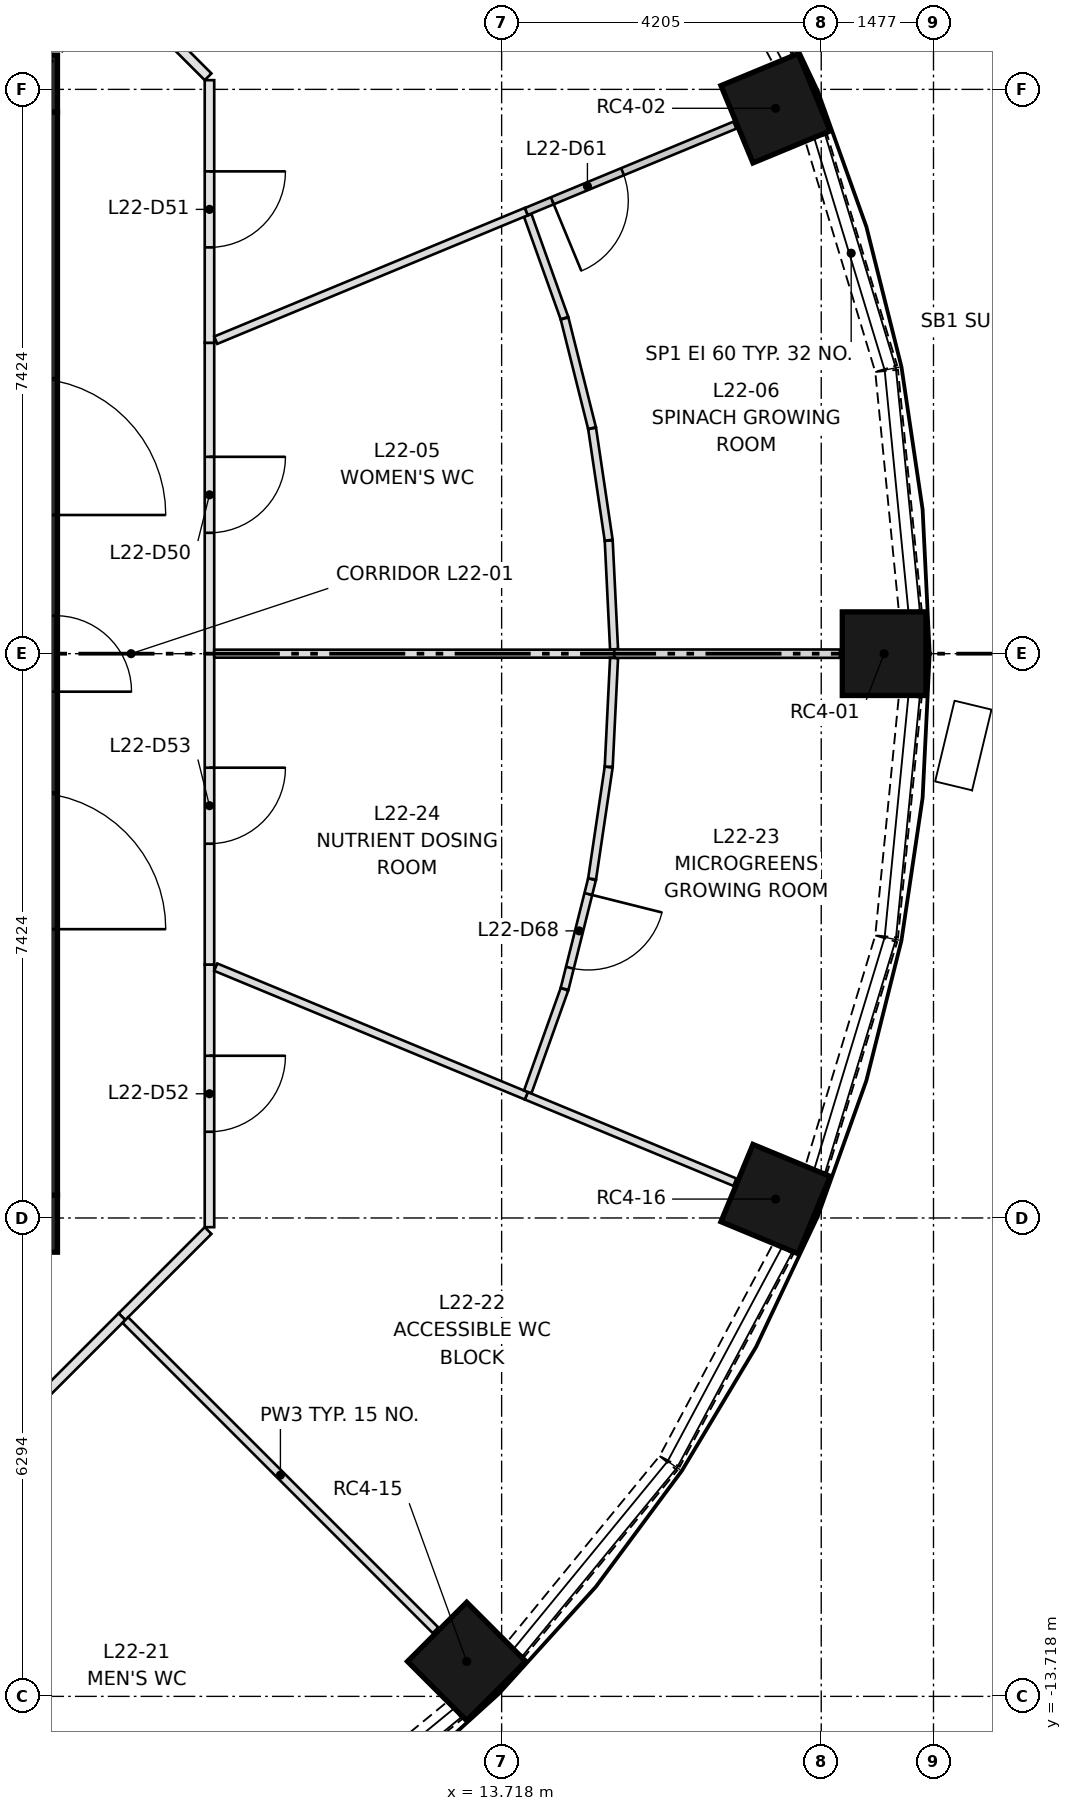
"""IFC4 building model, lengths in metres.
Left out: names, types, materials, properties, quantities, classifications, styles, units other than length and angle.
Written with IfcOpenShell. Run it as: python <this file> out.ifc"""

import sys

from ifc_helpers import new_model, si_unit, direction, frame, frame_2d, origin, origin_2d, place, context, subcontext, project, spatial, rectangle, extrude, element, fill, save


model = new_model("IFC4")
c1 = context("Model", 3, precision=1e-05, world=origin(), true_north=direction((0.0, 1.0)))
c2 = subcontext(c1, "Body", "Model", "MODEL_VIEW")
j1 = project(units=[si_unit("LENGTHUNIT", "METRE"), si_unit("PLANEANGLEUNIT", "RADIAN")], contexts=[c1])
p1 = place(None, origin())
s1 = spatial("IfcSite", under=j1, at=p1, CompositionType="ELEMENT")
p2 = place(p1, origin())
s2 = spatial("IfcBuilding", under=s1, at=p2, CompositionType="ELEMENT")
p3 = place(p2, frame((0.0, 0.0, 87.35)))
s3 = spatial("IfcBuildingStorey", under=s2, at=p3, CompositionType="ELEMENT", Elevation=87.35)
for number, where, z_axis, x_axis in (
    (1, (18.75, 0.0, 0.0), (0.0, 0.0, 1.0), (1.0, 0.0, 0.0)),
    (2, (17.323, 7.175, 0.0), (0.0, 0.0, 1.0), (0.924, 0.383, 0.0)),
    (3, (13.258, -13.258, 0.0), (0.0, 0.0, 1.0), (0.707, -0.707, 0.0)),
    (4, (17.323, -7.175, 0.0), (0.0, 0.0, 1.0), (0.924, -0.383, 0.0)),
):
    element("IfcColumn", number, at=place(p3, frame(where, z_axis=z_axis, x_axis=x_axis)), inside=s3, PredefinedType="COLUMN", context=c2, shape_type="SweptSolid", body=[
        extrude(rectangle(XDim=1.1, YDim=1.1, at=origin_2d()), origin(), (0.0, 0.0, 1.0), 3.65),
    ])
for number, where, z_axis, x_axis in (
    (5, (-7.874, -7.499, 0.0), (0.0, 0.0, 1.0), (1.0, 0.0, 0.0)),
    (6, (-7.874, 7.499, 0.0), (0.0, 0.0, 1.0), (1.0, 0.0, 0.0)),
):
    element("IfcWall", number, at=place(p3, frame(where, z_axis=z_axis, x_axis=x_axis)), inside=s3, PredefinedType="SHEAR", context=c2, shape_type="SweptSolid", body=[
        extrude(rectangle(XDim=15.748, YDim=0.75, at=frame_2d((7.874, 0.0))), origin(), (0.0, 0.0, 1.0), 3.65),
    ])
p4 = place(p3, frame((7.499, -7.124, 0.0), z_axis=(0.0, 0.0, 1.0), x_axis=(0.0, 1.0, 0.0)))
e7 = element("IfcWall", 7, at=p4, inside=s3, PredefinedType="SHEAR", context=c2, shape_type="SweptSolid", body=[
    extrude(rectangle(XDim=14.248, YDim=0.75, at=frame_2d((7.124, 0.0))), origin(), (0.0, 0.0, 1.0), 3.65),
])
p5 = place(p4, frame((6.624, 0.0, 0.0)))
e8 = element("IfcOpeningElement", 8, at=p5, cuts=e7, PredefinedType="OPENING", context=c2, shape_type="SweptSolid", body=[
    extrude(rectangle(XDim=1.0, YDim=2.1, at=frame_2d((0.5, 1.05))), frame((0.0, 0.385, 0.0), z_axis=(0.0, -1.0, 0.0), x_axis=(1.0, 0.0, 0.0)), (0.0, 0.0, 1.0), 0.77),
])
p6 = place(p4, frame((3.5, 0.0, 0.0)))
e9 = element("IfcOpeningElement", 9, at=p6, cuts=e7, PredefinedType="OPENING", context=c2, shape_type="SweptSolid", body=[
    extrude(rectangle(XDim=1.8, YDim=2.1, at=frame_2d((0.9, 1.05))), frame((0.0, 0.385, 0.0), z_axis=(0.0, -1.0, 0.0), x_axis=(1.0, 0.0, 0.0)), (0.0, 0.0, 1.0), 0.77),
])
p7 = place(p4, frame((8.948, 0.0, 0.0)))
e10 = element("IfcOpeningElement", 10, at=p7, cuts=e7, PredefinedType="OPENING", context=c2, shape_type="SweptSolid", body=[
    extrude(rectangle(XDim=1.8, YDim=2.1, at=frame_2d((0.9, 1.05))), frame((0.0, 0.385, 0.0), z_axis=(0.0, -1.0, 0.0), x_axis=(1.0, 0.0, 0.0)), (0.0, 0.0, 1.0), 0.77),
])
p8 = place(p3, frame((19.094, 0.564, 0.0), z_axis=(0.0, 0.0, 1.0), x_axis=(-0.098040704044, 0.995182405567, 0.0)))
e11 = element("IfcWall", 11, at=p8, inside=s3, PredefinedType="SOLIDWALL", context=c2, shape_type="SweptSolid", body=[
    extrude(rectangle(XDim=3.173, YDim=0.3, at=frame_2d((1.586, 0.0))), origin(), (0.0, 0.0, 1.0), 0.9),
])
p9 = place(p3, frame((18.778, 3.75, 0.0), z_axis=(0.0, 0.0, 1.0), x_axis=(-0.290325591482, 0.956927923582, 0.0)))
e12 = element("IfcWall", 12, at=p9, inside=s3, PredefinedType="SOLIDWALL", context=c2, shape_type="SweptSolid", body=[
    extrude(rectangle(XDim=3.173, YDim=0.3, at=frame_2d((1.586, 0.0))), origin(), (0.0, 0.0, 1.0), 0.9),
])
p10 = place(p3, frame((17.425, 7.828, 0.0), z_axis=(0.0, 0.0, 1.0), x_axis=(-0.471458802606, 0.88188808669, 0.0)))
e13 = element("IfcWall", 13, at=p10, inside=s3, PredefinedType="SOLIDWALL", context=c2, shape_type="SweptSolid", body=[
    extrude(rectangle(XDim=3.172, YDim=0.3, at=frame_2d((1.586, 0.0))), origin(), (0.0, 0.0, 1.0), 0.9),
])
for number, where, z_axis, x_axis in (
    (14, (10.651, -15.913, 0.0), (0.0, 0.0, 1.0), (0.773, 0.634, 0.0)),
    (15, (13.9, -13.104, 0.0), (0.0, 0.0, 1.0), (0.634, 0.773, 0.0)),
):
    element("IfcWall", number, at=place(p3, frame(where, z_axis=z_axis, x_axis=x_axis)), inside=s3, PredefinedType="SOLIDWALL", context=c2, shape_type="SweptSolid", body=[
        extrude(rectangle(XDim=3.173, YDim=0.3, at=frame_2d((1.586, 0.0))), origin(), (0.0, 0.0, 1.0), 0.9),
    ])
p11 = place(p3, frame((15.929, -10.626, 0.0), z_axis=(0.0, 0.0, 1.0), x_axis=(0.471458802606, 0.88188808669, 0.0)))
e16 = element("IfcWall", 16, at=p11, inside=s3, PredefinedType="SOLIDWALL", context=c2, shape_type="SweptSolid", body=[
    extrude(rectangle(XDim=3.172, YDim=0.3, at=frame_2d((1.586, 0.0))), origin(), (0.0, 0.0, 1.0), 0.9),
])
p12 = place(p3, frame((17.856, -6.787, 0.0), z_axis=(0.0, 0.0, 1.0), x_axis=(0.290325591482, 0.956927923582, 0.0)))
e17 = element("IfcWall", 17, at=p12, inside=s3, PredefinedType="SOLIDWALL", context=c2, shape_type="SweptSolid", body=[
    extrude(rectangle(XDim=3.173, YDim=0.3, at=frame_2d((1.586, 0.0))), origin(), (0.0, 0.0, 1.0), 0.9),
])
p13 = place(p3, frame((18.783, -3.721, 0.0), z_axis=(0.0, 0.0, 1.0), x_axis=(0.098040704044, 0.995182405567, 0.0)))
e18 = element("IfcWall", 18, at=p13, inside=s3, PredefinedType="SOLIDWALL", context=c2, shape_type="SweptSolid", body=[
    extrude(rectangle(XDim=3.173, YDim=0.3, at=frame_2d((1.586, 0.0))), origin(), (0.0, 0.0, 1.0), 0.9),
])
p14 = place(p3, frame((9.874, 4.09, 0.0), z_axis=(0.0, 0.0, 1.0), x_axis=(0.0, -1.0, 0.0)))
e19 = element("IfcWall", 19, at=p14, inside=s3, PredefinedType="PARTITIONING", context=c2, shape_type="SweptSolid", body=[
    extrude(rectangle(XDim=4.09, YDim=0.125, at=frame_2d((2.045, 0.0))), origin(), (0.0, 0.0, 1.0), 3.3),
])
p15 = place(p14, frame((1.5, 0.0, 0.0)))
e20 = element("IfcOpeningElement", 20, at=p15, cuts=e19, PredefinedType="OPENING", context=c2, shape_type="SweptSolid", body=[
    extrude(rectangle(XDim=1.0, YDim=2.1, at=frame_2d((0.5, 1.05))), frame((0.0, 0.073, 0.0), z_axis=(0.0, -1.0, 0.0), x_axis=(1.0, 0.0, 0.0)), (0.0, 0.0, 1.0), 0.145),
])
p16 = place(p3, frame((8.722, 8.722, 0.0), z_axis=(0.0, 0.0, 1.0), x_axis=(0.70718294931, -0.707030604857, 0.0)))
e21 = element("IfcWall", 21, at=p16, inside=s3, PredefinedType="PARTITIONING", context=c2, shape_type="SweptSolid", body=[
    extrude(rectangle(XDim=1.603, YDim=0.125, at=frame_2d((0.801, 0.0))), origin(), (0.0, 0.0, 1.0), 3.3),
])
p17 = place(p3, frame((9.874, 7.545, 0.0), z_axis=(0.0, 0.0, 1.0), x_axis=(0.0, -1.0, 0.0)))
e22 = element("IfcWall", 22, at=p17, inside=s3, PredefinedType="PARTITIONING", context=c2, shape_type="SweptSolid", body=[
    extrude(rectangle(XDim=3.455, YDim=0.125, at=frame_2d((1.728, 0.0))), origin(), (0.0, 0.0, 1.0), 3.3),
])
p18 = place(p17, frame((1.2, 0.0, 0.0)))
e23 = element("IfcOpeningElement", 23, at=p18, cuts=e22, PredefinedType="OPENING", context=c2, shape_type="SweptSolid", body=[
    extrude(rectangle(XDim=1.0, YDim=2.1, at=frame_2d((0.5, 1.05))), frame((0.0, 0.073, 0.0), z_axis=(0.0, -1.0, 0.0), x_axis=(1.0, 0.0, 0.0)), (0.0, 0.0, 1.0), 0.145),
])
p19 = place(p3, frame((9.856, -7.589, 0.0), z_axis=(0.0, 0.0, 1.0), x_axis=(-0.70718294931, -0.707030604857, 0.0)))
e24 = element("IfcWall", 24, at=p19, inside=s3, PredefinedType="PARTITIONING", context=c2, shape_type="SweptSolid", body=[
    extrude(rectangle(XDim=1.603, YDim=0.125, at=frame_2d((0.801, 0.0))), origin(), (0.0, 0.0, 1.0), 3.3),
])
p20 = place(p3, frame((9.874, -4.09, 0.0), z_axis=(0.0, 0.0, 1.0), x_axis=(0.0, -1.0, 0.0)))
e25 = element("IfcWall", 25, at=p20, inside=s3, PredefinedType="PARTITIONING", context=c2, shape_type="SweptSolid", body=[
    extrude(rectangle(XDim=3.455, YDim=0.125, at=frame_2d((1.728, 0.0))), origin(), (0.0, 0.0, 1.0), 3.3),
])
p21 = place(p20, frame((1.2, 0.0, 0.0)))
e26 = element("IfcOpeningElement", 26, at=p21, cuts=e25, PredefinedType="OPENING", context=c2, shape_type="SweptSolid", body=[
    extrude(rectangle(XDim=1.0, YDim=2.1, at=frame_2d((0.5, 1.05))), frame((0.0, 0.073, 0.0), z_axis=(0.0, -1.0, 0.0), x_axis=(1.0, 0.0, 0.0)), (0.0, 0.0, 1.0), 0.145),
])
p22 = place(p3, frame((9.874, 0.0, 0.0), z_axis=(0.0, 0.0, 1.0), x_axis=(0.0, -1.0, 0.0)))
e27 = element("IfcWall", 27, at=p22, inside=s3, PredefinedType="PARTITIONING", context=c2, shape_type="SweptSolid", body=[
    extrude(rectangle(XDim=4.09, YDim=0.125, at=frame_2d((2.045, 0.0))), origin(), (0.0, 0.0, 1.0), 3.3),
])
p23 = place(p22, frame((1.5, 0.0, 0.0)))
e28 = element("IfcOpeningElement", 28, at=p23, cuts=e27, PredefinedType="OPENING", context=c2, shape_type="SweptSolid", body=[
    extrude(rectangle(XDim=1.0, YDim=2.1, at=frame_2d((0.5, 1.05))), frame((0.0, 0.073, 0.0), z_axis=(0.0, -1.0, 0.0), x_axis=(1.0, 0.0, 0.0)), (0.0, 0.0, 1.0), 0.145),
])
p24 = place(p3, frame((8.722, -8.722, 0.0), z_axis=(0.0, 0.0, 1.0), x_axis=(-0.707030604857, -0.70718294931, 0.0)))
e29 = element("IfcWall", 29, at=p24, inside=s3, PredefinedType="PARTITIONING", context=c2, shape_type="SweptSolid", body=[
    extrude(rectangle(XDim=1.603, YDim=0.125, at=frame_2d((0.801, 0.0))), origin(), (0.0, 0.0, 1.0), 3.3),
])
p25 = place(p3, frame((14.062, 5.765, 0.0), z_axis=(0.0, 0.0, 1.0), x_axis=(0.336940319535, -0.941526006583, 0.0)))
e30 = element("IfcWall", 30, at=p25, inside=s3, PredefinedType="PARTITIONING", context=c2, shape_type="SweptSolid", body=[
    extrude(rectangle(XDim=1.434, YDim=0.105, at=frame_2d((0.717, 0.0))), origin(), (0.0, 0.0, 1.0), 3.3),
])
p26 = place(p3, frame((14.546, 4.41, 0.0), z_axis=(0.0, 0.0, 1.0), x_axis=(0.242922070527, -0.970045806986, 0.0)))
e31 = element("IfcWall", 31, at=p26, inside=s3, PredefinedType="PARTITIONING", context=c2, shape_type="SweptSolid", body=[
    extrude(rectangle(XDim=1.486, YDim=0.105, at=frame_2d((0.743, 0.0))), origin(), (0.0, 0.0, 1.0), 3.3),
])
p27 = place(p3, frame((14.908, 2.963, 0.0), z_axis=(0.0, 0.0, 1.0), x_axis=(0.146822447166, -0.989162862732, 0.0)))
e32 = element("IfcWall", 32, at=p27, inside=s3, PredefinedType="PARTITIONING", context=c2, shape_type="SweptSolid", body=[
    extrude(rectangle(XDim=1.487, YDim=0.105, at=frame_2d((0.743, 0.0))), origin(), (0.0, 0.0, 1.0), 3.3),
])
p28 = place(p3, frame((15.127, 1.487, 0.0), z_axis=(0.0, 0.0, 1.0), x_axis=(0.0491209592, -0.998792837062, 0.0)))
e33 = element("IfcWall", 33, at=p28, inside=s3, PredefinedType="PARTITIONING", context=c2, shape_type="SweptSolid", body=[
    extrude(rectangle(XDim=1.431, YDim=0.105, at=frame_2d((0.716, 0.0))), origin(), (0.0, 0.0, 1.0), 3.3),
])
p29 = place(p3, frame((9.957, 4.124, 0.0), z_axis=(0.0, 0.0, 1.0), x_axis=(0.923862097388, 0.382725521764, 0.0)))
e34 = element("IfcWall", 34, at=p29, inside=s3, PredefinedType="PARTITIONING", context=c2, shape_type="SweptSolid", body=[
    extrude(rectangle(XDim=4.423, YDim=0.105, at=frame_2d((2.211, 0.0))), origin(), (0.0, 0.0, 1.0), 3.3),
])
p30 = place(p3, frame((15.2, 0.0, 0.0), z_axis=(0.0, 0.0, 1.0), x_axis=(-1.0, 0.0, 0.0)))
e35 = element("IfcWall", 35, at=p30, inside=s3, PredefinedType="PARTITIONING", context=c2, shape_type="SweptSolid", body=[
    extrude(rectangle(XDim=5.263, YDim=0.105, at=frame_2d((2.632, 0.0))), origin(), (0.0, 0.0, 1.0), 3.3),
])
p31 = place(p3, frame((16.787, 6.953, 0.0), z_axis=(0.0, 0.0, 1.0), x_axis=(-0.923889594764, -0.382659139036, 0.0)))
e36 = element("IfcWall", 36, at=p31, inside=s3, PredefinedType="PARTITIONING", context=c2, shape_type="SweptSolid", body=[
    extrude(rectangle(XDim=2.97, YDim=0.1, at=frame_2d((1.485, 0.0))), origin(), (0.0, 0.0, 1.0), 3.3),
])
p32 = place(p31, frame((1.6, 0.0, 0.0)))
e37 = element("IfcOpeningElement", 37, at=p32, cuts=e36, PredefinedType="OPENING", context=c2, shape_type="SweptSolid", body=[
    extrude(rectangle(XDim=1.0, YDim=2.1, at=frame_2d((0.5, 1.05))), frame((0.0, 0.06, 0.0), z_axis=(0.0, -1.0, 0.0), x_axis=(1.0, 0.0, 0.0)), (0.0, 0.0, 1.0), 0.12),
])
p33 = place(p3, frame((18.17, 0.0, 0.0), z_axis=(0.0, 0.0, 1.0), x_axis=(-1.0, 0.0, 0.0)))
e38 = element("IfcWall", 38, at=p33, inside=s3, PredefinedType="PARTITIONING", context=c2, shape_type="SweptSolid", body=[
    extrude(rectangle(XDim=2.97, YDim=0.11, at=frame_2d((1.485, 0.0))), origin(), (0.0, 0.0, 1.0), 3.3),
])
p34 = place(p3, frame((8.767, -8.767, 0.0), z_axis=(0.0, 0.0, 1.0), x_axis=(0.707106781187, -0.707106781187, 0.0)))
e39 = element("IfcWall", 39, at=p34, inside=s3, PredefinedType="PARTITIONING", context=c2, shape_type="SweptSolid", body=[
    extrude(rectangle(XDim=5.772, YDim=0.105, at=frame_2d((2.886, 0.0))), origin(), (0.0, 0.0, 1.0), 3.3),
])
p35 = place(p3, frame((14.043, -5.817, 0.0), z_axis=(0.0, 0.0, 1.0), x_axis=(0.923889594764, -0.382659139036, 0.0)))
e40 = element("IfcWall", 40, at=p35, inside=s3, PredefinedType="PARTITIONING", context=c2, shape_type="SweptSolid", body=[
    extrude(rectangle(XDim=2.97, YDim=0.105, at=frame_2d((1.485, 0.0))), origin(), (0.0, 0.0, 1.0), 3.3),
])
p36 = place(p3, frame((9.957, -4.124, 0.0), z_axis=(0.0, 0.0, 1.0), x_axis=(0.923862097388, -0.382725521764, 0.0)))
e41 = element("IfcWall", 41, at=p36, inside=s3, PredefinedType="PARTITIONING", context=c2, shape_type="SweptSolid", body=[
    extrude(rectangle(XDim=4.423, YDim=0.105, at=frame_2d((2.211, 0.0))), origin(), (0.0, 0.0, 1.0), 3.3),
])
p37 = place(p3, frame((14.062, -5.765, 0.0), z_axis=(0.0, 0.0, 1.0), x_axis=(0.336940319535, 0.941526006583, 0.0)))
e42 = element("IfcWall", 42, at=p37, inside=s3, PredefinedType="PARTITIONING", context=c2, shape_type="SweptSolid", body=[
    extrude(rectangle(XDim=1.434, YDim=0.105, at=frame_2d((0.717, 0.0))), origin(), (0.0, 0.0, 1.0), 3.3),
])
p38 = place(p3, frame((14.907, -2.968, 0.0), z_axis=(0.0, 0.0, 1.0), x_axis=(-0.242922070527, -0.970045806986, 0.0)))
e43 = element("IfcWall", 43, at=p38, inside=s3, PredefinedType="PARTITIONING", context=c2, shape_type="SweptSolid", body=[
    extrude(rectangle(XDim=1.486, YDim=0.105, at=frame_2d((0.743, 0.0))), origin(), (0.0, 0.0, 1.0), 3.3),
])
p39 = place(p38, frame((0.2, 0.0, 0.0)))
e44 = element("IfcOpeningElement", 44, at=p39, cuts=e43, PredefinedType="OPENING", context=c2, shape_type="SweptSolid", body=[
    extrude(rectangle(XDim=1.0, YDim=2.1, at=frame_2d((0.5, 1.05))), frame((0.0, 0.062, 0.0), z_axis=(0.0, -1.0, 0.0), x_axis=(1.0, 0.0, 0.0)), (0.0, 0.0, 1.0), 0.125),
])
p40 = place(p3, frame((14.908, -2.963, 0.0), z_axis=(0.0, 0.0, 1.0), x_axis=(0.146822447166, 0.989162862732, 0.0)))
e45 = element("IfcWall", 45, at=p40, inside=s3, PredefinedType="PARTITIONING", context=c2, shape_type="SweptSolid", body=[
    extrude(rectangle(XDim=1.487, YDim=0.105, at=frame_2d((0.743, 0.0))), origin(), (0.0, 0.0, 1.0), 3.3),
])
p41 = place(p3, frame((15.127, -1.487, 0.0), z_axis=(0.0, 0.0, 1.0), x_axis=(0.0491209592, 0.998792837062, 0.0)))
e46 = element("IfcWall", 46, at=p41, inside=s3, PredefinedType="PARTITIONING", context=c2, shape_type="SweptSolid", body=[
    extrude(rectangle(XDim=1.431, YDim=0.105, at=frame_2d((0.716, 0.0))), origin(), (0.0, 0.0, 1.0), 3.3),
])
p42 = place(p5, frame((1.0, 0.0, 0.0), z_axis=(0.0, 0.0, 1.0), x_axis=(-1.0, 0.0, 0.0)))
e47 = element("IfcDoor", 47, at=p42, inside=s3, OperationType="SINGLE_SWING_LEFT", PredefinedType="DOOR", context=c2, shape_type="SweptSolid", body=[
    extrude(rectangle(XDim=1.0, YDim=2.1, at=frame_2d((0.5, 1.05))), frame((0.0, 0.375, 0.0), z_axis=(0.0, -1.0, 0.0), x_axis=(1.0, 0.0, 0.0)), (0.0, 0.0, 1.0), 0.05),
])
fill(e8, e47)
p43 = place(p15, origin())
e48 = element("IfcDoor", 48, at=p43, inside=s3, OperationType="SINGLE_SWING_LEFT", PredefinedType="DOOR", context=c2, shape_type="SweptSolid", body=[
    extrude(rectangle(XDim=1.0, YDim=2.1, at=frame_2d((0.5, 1.05))), frame((0.0, 0.025, 0.0), z_axis=(0.0, -1.0, 0.0), x_axis=(1.0, 0.0, 0.0)), (0.0, 0.0, 1.0), 0.05),
])
fill(e20, e48)
p44 = place(p18, origin())
e49 = element("IfcDoor", 49, at=p44, inside=s3, OperationType="SINGLE_SWING_LEFT", PredefinedType="DOOR", context=c2, shape_type="SweptSolid", body=[
    extrude(rectangle(XDim=1.0, YDim=2.1, at=frame_2d((0.5, 1.05))), frame((0.0, 0.025, 0.0), z_axis=(0.0, -1.0, 0.0), x_axis=(1.0, 0.0, 0.0)), (0.0, 0.0, 1.0), 0.05),
])
fill(e23, e49)
p45 = place(p21, origin())
e50 = element("IfcDoor", 50, at=p45, inside=s3, OperationType="SINGLE_SWING_LEFT", PredefinedType="DOOR", context=c2, shape_type="SweptSolid", body=[
    extrude(rectangle(XDim=1.0, YDim=2.1, at=frame_2d((0.5, 1.05))), frame((0.0, 0.025, 0.0), z_axis=(0.0, -1.0, 0.0), x_axis=(1.0, 0.0, 0.0)), (0.0, 0.0, 1.0), 0.05),
])
fill(e26, e50)
p46 = place(p23, origin())
e51 = element("IfcDoor", 51, at=p46, inside=s3, OperationType="SINGLE_SWING_LEFT", PredefinedType="DOOR", context=c2, shape_type="SweptSolid", body=[
    extrude(rectangle(XDim=1.0, YDim=2.1, at=frame_2d((0.5, 1.05))), frame((0.0, 0.025, 0.0), z_axis=(0.0, -1.0, 0.0), x_axis=(1.0, 0.0, 0.0)), (0.0, 0.0, 1.0), 0.05),
])
fill(e28, e51)
p47 = place(p32, origin())
e52 = element("IfcDoor", 52, at=p47, inside=s3, OperationType="SINGLE_SWING_RIGHT", PredefinedType="DOOR", context=c2, shape_type="SweptSolid", body=[
    extrude(rectangle(XDim=1.0, YDim=2.1, at=frame_2d((0.5, 1.05))), frame((0.0, 0.025, 0.0), z_axis=(0.0, -1.0, 0.0), x_axis=(1.0, 0.0, 0.0)), (0.0, 0.0, 1.0), 0.05),
])
fill(e37, e52)
p48 = place(p39, origin())
e53 = element("IfcDoor", 53, at=p48, inside=s3, OperationType="SINGLE_SWING_LEFT", PredefinedType="DOOR", context=c2, shape_type="SweptSolid", body=[
    extrude(rectangle(XDim=1.0, YDim=2.1, at=frame_2d((0.5, 1.05))), frame((0.0, 0.025, 0.0), z_axis=(0.0, -1.0, 0.0), x_axis=(1.0, 0.0, 0.0)), (0.0, 0.0, 1.0), 0.05),
])
fill(e44, e53)
save(model, sys.argv[1])
